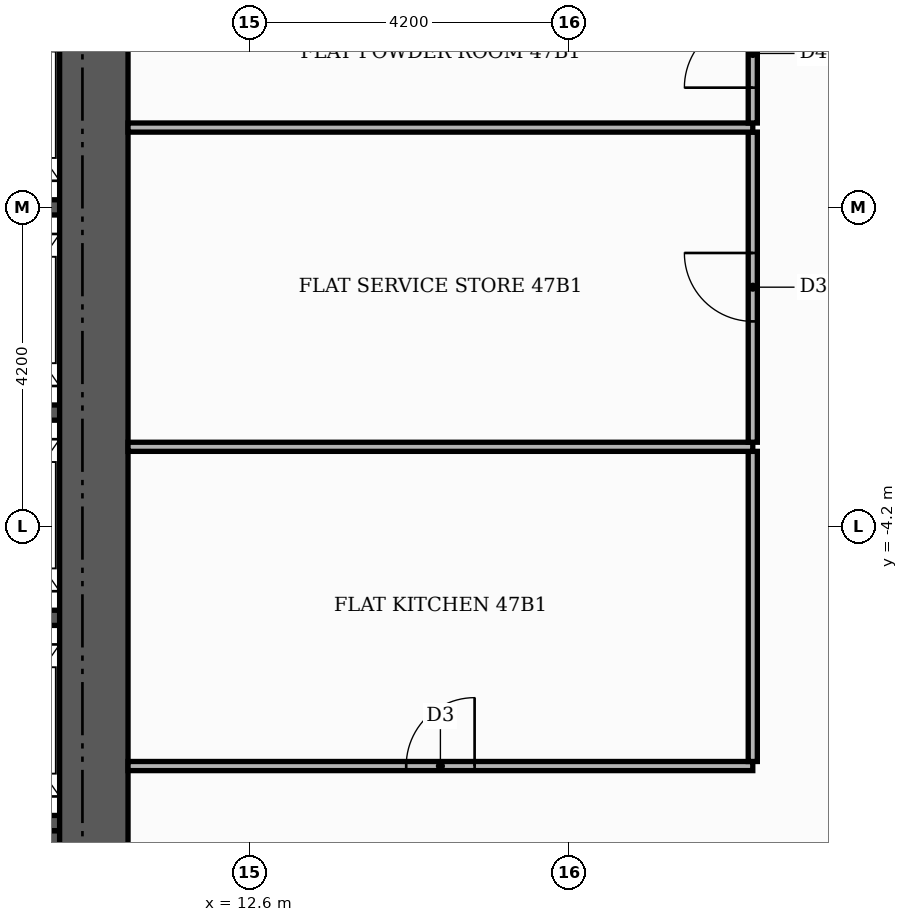
"""IFC4 building model, lengths in metres.
Left out: names, types, materials, properties, quantities, classifications, styles, units other than length and angle.
Written with IfcOpenShell. Run it as: python <this file> out.ifc"""

import sys

from ifc_helpers import new_model, si_unit, direction, frame, frame_2d, origin, place, context, subcontext, project, spatial, rectangle, extrude, element, fill, save


model = new_model("IFC4")
c1 = context("Model", 3, precision=1e-05, world=origin(), true_north=direction((0.0, 1.0)))
c2 = subcontext(c1, "Body", "Model", "MODEL_VIEW")
j1 = project(units=[si_unit("LENGTHUNIT", "METRE"), si_unit("PLANEANGLEUNIT", "RADIAN")], contexts=[c1])
p1 = place(None, origin())
s1 = spatial("IfcSite", under=j1, at=p1, CompositionType="ELEMENT")
p2 = place(p1, origin())
s2 = spatial("IfcBuilding", under=s1, at=p2, CompositionType="ELEMENT")
p3 = place(p2, frame((0.0, 0.0, 200.1)))
s3 = spatial("IfcBuildingStorey", under=s2, at=p3, CompositionType="ELEMENT", Elevation=200.1)
p4 = place(p3, frame((5.5, -9.15, 0.0), z_axis=(0.0, 0.0, 1.0), x_axis=(1.0, 0.0, 0.0)))
e1 = element("IfcWall", 1, at=p4, inside=s3, PredefinedType="SHEAR", context=c2, shape_type="SweptSolid", body=[
    extrude(rectangle(XDim=4.6, YDim=1.9, at=frame_2d((2.3, 0.0))), origin(), (0.0, 0.0, 1.0), 3.48),
])
for number, where, z_axis, x_axis in (
    (2, (8.1, -8.1, 0.0), (0.0, 0.0, 1.0), (1.0, 0.0, 0.0)),
    (3, (8.1, -5.4, 0.0), (0.0, 0.0, 1.0), (1.0, 0.0, 0.0)),
    (4, (8.1, -2.7, 0.0), (0.0, 0.0, 1.0), (1.0, 0.0, 0.0)),
    (5, (8.1, 0.0, 0.0), (0.0, 0.0, 1.0), (1.0, 0.0, 0.0)),
):
    element("IfcWall", number, at=place(p3, frame(where, z_axis=z_axis, x_axis=x_axis)), inside=s3, PredefinedType="SHEAR", context=c2, shape_type="SweptSolid", body=[
        extrude(rectangle(XDim=2.0, YDim=0.2, at=frame_2d((1.0, 0.0))), origin(), (0.0, 0.0, 1.0), 3.48),
    ])
p5 = place(p3, frame((10.55, -10.1, 0.0), z_axis=(0.0, 0.0, 1.0), x_axis=(0.0, 1.0, 0.0)))
e6 = element("IfcWall", 6, at=p5, inside=s3, PredefinedType="SHEAR", context=c2, shape_type="SweptSolid", body=[
    extrude(rectangle(XDim=20.2, YDim=0.9, at=frame_2d((10.1, 0.0))), origin(), (0.0, 0.0, 1.0), 3.48),
])
p6 = place(p3, frame((11.0, -7.35, 0.0), z_axis=(0.0, 0.0, 1.0), x_axis=(1.0, 0.0, 0.0)))
e7 = element("IfcWall", 7, at=p6, inside=s3, PredefinedType="PARTITIONING", context=c2, shape_type="SweptSolid", body=[
    extrude(rectangle(XDim=8.22, YDim=0.12, at=frame_2d((4.11, 0.0))), origin(), (0.0, 0.0, 1.0), 3.48),
])
p7 = place(p6, frame((3.66, 0.0, 0.0)))
e8 = element("IfcOpeningElement", 8, at=p7, cuts=e7, PredefinedType="OPENING", context=c2, shape_type="SweptSolid", body=[
    extrude(rectangle(XDim=0.9, YDim=2.1, at=frame_2d((0.45, 1.05))), frame((0.0, 0.07, 0.0), z_axis=(0.0, -1.0, 0.0), x_axis=(1.0, 0.0, 0.0)), (0.0, 0.0, 1.0), 0.14),
])
p8 = place(p3, frame((19.22, -7.29, 0.0), z_axis=(0.0, 0.0, 1.0), x_axis=(0.0, 1.0, 0.0)))
e9 = element("IfcWall", 9, at=p8, inside=s3, PredefinedType="PARTITIONING", context=c2, shape_type="SweptSolid", body=[
    extrude(rectangle(XDim=4.08, YDim=0.12, at=frame_2d((2.04, 0.0))), origin(), (0.0, 0.0, 1.0), 3.48),
])
p9 = place(p3, frame((11.0, -3.15, 0.0), z_axis=(0.0, 0.0, 1.0), x_axis=(1.0, 0.0, 0.0)))
e10 = element("IfcWall", 10, at=p9, inside=s3, PredefinedType="PARTITIONING", context=c2, shape_type="SweptSolid", body=[
    extrude(rectangle(XDim=8.22, YDim=0.12, at=frame_2d((4.11, 0.0))), origin(), (0.0, 0.0, 1.0), 3.48),
])
p10 = place(p3, frame((19.22, -3.09, 0.0), z_axis=(0.0, 0.0, 1.0), x_axis=(0.0, 1.0, 0.0)))
e11 = element("IfcWall", 11, at=p10, inside=s3, PredefinedType="PARTITIONING", context=c2, shape_type="SweptSolid", body=[
    extrude(rectangle(XDim=4.08, YDim=0.12, at=frame_2d((2.04, 0.0))), origin(), (0.0, 0.0, 1.0), 3.48),
])
p11 = place(p10, frame((1.59, 0.0, 0.0)))
e12 = element("IfcOpeningElement", 12, at=p11, cuts=e11, PredefinedType="OPENING", context=c2, shape_type="SweptSolid", body=[
    extrude(rectangle(XDim=0.9, YDim=2.1, at=frame_2d((0.45, 1.05))), frame((0.0, 0.07, 0.0), z_axis=(0.0, -1.0, 0.0), x_axis=(1.0, 0.0, 0.0)), (0.0, 0.0, 1.0), 0.14),
])
p12 = place(p3, frame((11.0, 1.05, 0.0), z_axis=(0.0, 0.0, 1.0), x_axis=(1.0, 0.0, 0.0)))
e13 = element("IfcWall", 13, at=p12, inside=s3, PredefinedType="PARTITIONING", context=c2, shape_type="SweptSolid", body=[
    extrude(rectangle(XDim=8.22, YDim=0.12, at=frame_2d((4.11, 0.0))), origin(), (0.0, 0.0, 1.0), 3.48),
])
p13 = place(p3, frame((19.22, 1.11, 0.0), z_axis=(0.0, 0.0, 1.0), x_axis=(0.0, 1.0, 0.0)))
e14 = element("IfcWall", 14, at=p13, inside=s3, PredefinedType="PARTITIONING", context=c2, shape_type="SweptSolid", body=[
    extrude(rectangle(XDim=1.83, YDim=0.12, at=frame_2d((0.915, 0.0))), origin(), (0.0, 0.0, 1.0), 3.48),
])
p14 = place(p13, frame((0.465, 0.0, 0.0)))
e15 = element("IfcOpeningElement", 15, at=p14, cuts=e14, PredefinedType="OPENING", context=c2, shape_type="SweptSolid", body=[
    extrude(rectangle(XDim=0.9, YDim=2.1, at=frame_2d((0.45, 1.05))), frame((0.0, 0.07, 0.0), z_axis=(0.0, -1.0, 0.0), x_axis=(1.0, 0.0, 0.0)), (0.0, 0.0, 1.0), 0.14),
])
p15 = place(p7, origin())
e16 = element("IfcDoor", 16, at=p15, inside=s3, OperationType="SINGLE_SWING_RIGHT", PredefinedType="DOOR", context=c2, shape_type="SweptSolid", body=[
    extrude(rectangle(XDim=0.9, YDim=2.1, at=frame_2d((0.45, 1.05))), frame((0.0, 0.025, 0.0), z_axis=(0.0, -1.0, 0.0), x_axis=(1.0, 0.0, 0.0)), (0.0, 0.0, 1.0), 0.05),
])
fill(e8, e16)
p16 = place(p11, origin())
e17 = element("IfcDoor", 17, at=p16, inside=s3, OperationType="SINGLE_SWING_RIGHT", PredefinedType="DOOR", context=c2, shape_type="SweptSolid", body=[
    extrude(rectangle(XDim=0.9, YDim=2.1, at=frame_2d((0.45, 1.05))), frame((0.0, 0.025, 0.0), z_axis=(0.0, -1.0, 0.0), x_axis=(1.0, 0.0, 0.0)), (0.0, 0.0, 1.0), 0.05),
])
fill(e12, e17)
p17 = place(p14, origin())
e18 = element("IfcDoor", 18, at=p17, inside=s3, OperationType="SINGLE_SWING_LEFT", PredefinedType="DOOR", context=c2, shape_type="SweptSolid", body=[
    extrude(rectangle(XDim=0.9, YDim=2.1, at=frame_2d((0.45, 1.05))), frame((0.0, 0.025, 0.0), z_axis=(0.0, -1.0, 0.0), x_axis=(1.0, 0.0, 0.0)), (0.0, 0.0, 1.0), 0.05),
])
fill(e15, e18)
save(model, sys.argv[1])
